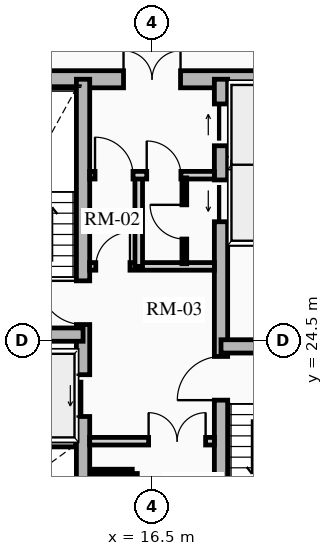
"""IFC4 building model, lengths in metres.
Left out: names, types, materials, properties, quantities, classifications, styles, units other than length and angle.
Written with IfcOpenShell. Run it as: python <this file> out.ifc"""

import sys

from ifc_helpers import new_model, si_unit, direction, frame, frame_2d, origin, place, context, subcontext, project, spatial, rectangle, extrude, source, transform, mapped, element, fill, save


model = new_model("IFC4")
c1 = context("Model", 3, precision=1e-05, world=origin(), true_north=direction((0.0, 1.0)))
c2 = subcontext(c1, "Body", "Model", "MODEL_VIEW")
j1 = project(units=[si_unit("LENGTHUNIT", "METRE"), si_unit("PLANEANGLEUNIT", "RADIAN")], contexts=[c1])
p1 = place(None, origin())
s1 = spatial("IfcSite", under=j1, at=p1, CompositionType="ELEMENT")
p2 = place(p1, origin())
s2 = spatial("IfcBuilding", under=s1, at=p2, CompositionType="ELEMENT")
p3 = place(p2, frame((0.0, 0.0, 119.62)))
s3 = spatial("IfcBuildingStorey", under=s2, at=p3, CompositionType="ELEMENT", Elevation=119.62)
p4 = place(p3, frame((11.15, 31.375, 0.0), z_axis=(0.0, 0.0, 1.0), x_axis=(1.0, 0.0, 0.0)))
e1 = element("IfcWall", 1, at=p4, inside=s3, PredefinedType="SHEAR", context=c2, shape_type="SweptSolid", body=[
    extrude(rectangle(XDim=10.7, YDim=0.45, at=frame_2d((5.35, 0.0))), origin(), (0.0, 0.0, 1.0), 2.91),
])
m1 = source(origin(), c2, "Body", "SweptSolid", [
    extrude(rectangle(XDim=1.5, YDim=2.02, at=frame_2d((0.75, 1.01))), frame((0.0, 0.235, 0.0), z_axis=(0.0, -1.0, 0.0), x_axis=(1.0, 0.0, 0.0)), (0.0, 0.0, 1.0), 0.47),
])
p5 = place(p4, frame((4.6, 0.0, 0.0)))
e2 = element("IfcOpeningElement", 2, at=p5, cuts=e1, PredefinedType="OPENING", context=c2, shape_type="MappedRepresentation", body=[
    mapped(m1, transform((0.0, 0.0, 0.0), x_axis=(1.0, 0.0, 0.0), y_axis=(0.0, 1.0, 0.0), z_axis=(0.0, 0.0, 1.0), scale=1.0)),
])
p6 = place(p3, frame((14.685, 17.625, 0.0), z_axis=(0.0, 0.0, 1.0), x_axis=(0.0, 1.0, 0.0)))
e3 = element("IfcWall", 3, at=p6, inside=s3, PredefinedType="SHEAR", context=c2, shape_type="SweptSolid", body=[
    extrude(rectangle(XDim=13.75, YDim=0.35, at=frame_2d((6.875, 0.0))), origin(), (0.0, 0.0, 1.0), 2.91),
])
m2 = source(origin(), c2, "Body", "SweptSolid", [
    extrude(rectangle(XDim=1.1, YDim=2.015, at=frame_2d((0.55, 1.007))), frame((0.0, 0.185, 0.0), z_axis=(0.0, -1.0, 0.0), x_axis=(1.0, 0.0, 0.0)), (0.0, 0.0, 1.0), 0.37),
])
p7 = place(p6, frame((4.875, 0.0, 0.0)))
e4 = element("IfcOpeningElement", 4, at=p7, cuts=e3, PredefinedType="OPENING", context=c2, shape_type="MappedRepresentation", body=[
    mapped(m2, transform((0.0, 0.0, 0.0), x_axis=(1.0, 0.0, 0.0), y_axis=(0.0, 1.0, 0.0), z_axis=(0.0, 0.0, 1.0), scale=1.0)),
])
m3 = source(origin(), c2, "Body", "SweptSolid", [
    extrude(rectangle(XDim=1.15, YDim=2.02, at=frame_2d((0.575, 1.01))), frame((0.0, 0.185, 0.0), z_axis=(0.0, -1.0, 0.0), x_axis=(1.0, 0.0, 0.0)), (0.0, 0.0, 1.0), 0.37),
])
p8 = place(p6, frame((7.295, 0.0, 0.0)))
e5 = element("IfcOpeningElement", 5, at=p8, cuts=e3, PredefinedType="OPENING", context=c2, shape_type="MappedRepresentation", body=[
    mapped(m3, transform((0.0, 0.0, 0.0), x_axis=(1.0, 0.0, 0.0), y_axis=(0.0, 1.0, 0.0), z_axis=(0.0, 0.0, 1.0), scale=1.0)),
])
p9 = place(p3, frame((18.315, 17.625, 0.0), z_axis=(0.0, 0.0, 1.0), x_axis=(0.0, 1.0, 0.0)))
e6 = element("IfcWall", 6, at=p9, inside=s3, PredefinedType="SHEAR", context=c2, shape_type="SweptSolid", body=[
    extrude(rectangle(XDim=13.75, YDim=0.35, at=frame_2d((6.875, 0.0))), origin(), (0.0, 0.0, 1.0), 2.91),
])
p10 = place(p9, frame((10.0, 0.0, 0.0)))
e7 = element("IfcOpeningElement", 7, at=p10, cuts=e6, PredefinedType="OPENING", context=c2, shape_type="MappedRepresentation", body=[
    mapped(m2, transform((0.0, 0.0, 0.0), x_axis=(1.0, 0.0, 0.0), y_axis=(0.0, 1.0, 0.0), z_axis=(0.0, 0.0, 1.0), scale=1.0)),
])
p11 = place(p9, frame((12.0, 0.0, 0.0)))
e8 = element("IfcOpeningElement", 8, at=p11, cuts=e6, PredefinedType="OPENING", context=c2, shape_type="MappedRepresentation", body=[
    mapped(m2, transform((0.0, 0.0, 0.0), x_axis=(1.0, 0.0, 0.0), y_axis=(0.0, 1.0, 0.0), z_axis=(0.0, 0.0, 1.0), scale=1.0)),
])
p12 = place(p9, frame((5.305, 0.0, 0.0)))
e9 = element("IfcOpeningElement", 9, at=p12, cuts=e6, PredefinedType="OPENING", context=c2, shape_type="MappedRepresentation", body=[
    mapped(m3, transform((0.0, 0.0, 0.0), x_axis=(1.0, 0.0, 0.0), y_axis=(0.0, 1.0, 0.0), z_axis=(0.0, 0.0, 1.0), scale=1.0)),
])
for number, where, z_axis, x_axis in (
    (10, (11.4, 24.655, 0.0), (0.0, 0.0, 1.0), (1.0, 0.0, 0.0)),
    (11, (18.315, 24.345, 0.0), (0.0, 0.0, 1.0), (1.0, 0.0, 0.0)),
):
    element("IfcWall", number, at=place(p3, frame(where, z_axis=z_axis, x_axis=x_axis)), inside=s3, PredefinedType="SHEAR", context=c2, shape_type="SweptSolid", body=[
        extrude(rectangle(XDim=3.285, YDim=0.35, at=frame_2d((1.643, 0.0))), origin(), (0.0, 0.0, 1.0), 2.91),
    ])
for number, where, z_axis, x_axis in (
    (12, (11.52, 21.8, 0.0), (0.0, 0.0, 1.0), (1.0, 0.0, 0.0)),
    (13, (18.51, 27.13, 0.0), (0.0, 0.0, 1.0), (1.0, 0.0, 0.0)),
    (14, (18.51, 29.175, 0.0), (0.0, 0.0, 1.0), (1.0, 0.0, 0.0)),
):
    element("IfcWall", number, at=place(p3, frame(where, z_axis=z_axis, x_axis=x_axis)), inside=s3, PredefinedType="SHEAR", context=c2, shape_type="SweptSolid", body=[
        extrude(rectangle(XDim=2.97, YDim=0.2, at=frame_2d((1.485, 0.0))), origin(), (0.0, 0.0, 1.0), 2.91),
    ])
p13 = place(p3, frame((14.86, 21.85, 0.0), z_axis=(0.0, 0.0, 1.0), x_axis=(1.0, 0.0, 0.0)))
e15 = element("IfcWall", 15, at=p13, inside=s3, PredefinedType="PARTITIONING", context=c2, shape_type="SweptSolid", body=[
    extrude(rectangle(XDim=3.28, YDim=0.2, at=frame_2d((1.64, 0.0))), origin(), (0.0, 0.0, 1.0), 2.655),
])
m4 = source(origin(), c2, "Body", "SweptSolid", [
    extrude(rectangle(XDim=1.5, YDim=2.02, at=frame_2d((0.75, 1.01))), frame((0.0, 0.11, 0.0), z_axis=(0.0, -1.0, 0.0), x_axis=(1.0, 0.0, 0.0)), (0.0, 0.0, 1.0), 0.22),
])
p14 = place(p13, frame((1.55, 0.0, 0.0)))
e16 = element("IfcOpeningElement", 16, at=p14, cuts=e15, PredefinedType="OPENING", context=c2, shape_type="MappedRepresentation", body=[
    mapped(m4, transform((0.0, 0.0, 0.0), x_axis=(1.0, 0.0, 0.0), y_axis=(0.0, 1.0, 0.0), z_axis=(0.0, 0.0, 1.0), scale=1.0)),
])
p15 = place(p3, frame((14.86, 26.45, 0.0), z_axis=(0.0, 0.0, 1.0), x_axis=(1.0, 0.0, 0.0)))
e17 = element("IfcWall", 17, at=p15, inside=s3, PredefinedType="PARTITIONING", context=c2, shape_type="SweptSolid", body=[
    extrude(rectangle(XDim=3.28, YDim=0.2, at=frame_2d((1.64, 0.0))), origin(), (0.0, 0.0, 1.0), 2.655),
])
m5 = source(origin(), c2, "Body", "SweptSolid", [
    extrude(rectangle(XDim=0.9, YDim=2.005, at=frame_2d((0.45, 1.002))), frame((0.0, 0.11, 0.0), z_axis=(0.0, -1.0, 0.0), x_axis=(1.0, 0.0, 0.0)), (0.0, 0.0, 1.0), 0.22),
])
p16 = place(p15, frame((0.16, 0.0, 0.0)))
e18 = element("IfcOpeningElement", 18, at=p16, cuts=e17, PredefinedType="OPENING", context=c2, shape_type="MappedRepresentation", body=[
    mapped(m5, transform((0.0, 0.0, 0.0), x_axis=(1.0, 0.0, 0.0), y_axis=(0.0, 1.0, 0.0), z_axis=(0.0, 0.0, 1.0), scale=1.0)),
])
p17 = place(p3, frame((16.15, 26.45, 0.0), z_axis=(0.0, 0.0, 1.0), x_axis=(0.0, 1.0, 0.0)))
e19 = element("IfcWall", 19, at=p17, inside=s3, PredefinedType="PARTITIONING", context=c2, shape_type="SweptSolid", body=[
    extrude(rectangle(XDim=2.4, YDim=0.2, at=frame_2d((1.2, 0.0))), origin(), (0.0, 0.0, 1.0), 2.655),
])
p18 = place(p3, frame((14.86, 28.85, 0.0), z_axis=(0.0, 0.0, 1.0), x_axis=(1.0, 0.0, 0.0)))
e20 = element("IfcWall", 20, at=p18, inside=s3, PredefinedType="PARTITIONING", context=c2, shape_type="SweptSolid", body=[
    extrude(rectangle(XDim=3.28, YDim=0.2, at=frame_2d((1.64, 0.0))), origin(), (0.0, 0.0, 1.0), 2.655),
])
m6 = source(origin(), c2, "Body", "SweptSolid", [
    extrude(rectangle(XDim=1.0, YDim=2.015, at=frame_2d((0.5, 1.007))), frame((0.0, 0.11, 0.0), z_axis=(0.0, -1.0, 0.0), x_axis=(1.0, 0.0, 0.0)), (0.0, 0.0, 1.0), 0.22),
])
p19 = place(p18, frame((0.14, 0.0, 0.0)))
e21 = element("IfcOpeningElement", 21, at=p19, cuts=e20, PredefinedType="OPENING", context=c2, shape_type="MappedRepresentation", body=[
    mapped(m6, transform((0.0, 0.0, 0.0), x_axis=(1.0, 0.0, 0.0), y_axis=(0.0, 1.0, 0.0), z_axis=(0.0, 0.0, 1.0), scale=1.0)),
])
p20 = place(p18, frame((1.5, 0.0, 0.0)))
e22 = element("IfcOpeningElement", 22, at=p20, cuts=e20, PredefinedType="OPENING", context=c2, shape_type="MappedRepresentation", body=[
    mapped(m5, transform((0.0, 0.0, 0.0), x_axis=(1.0, 0.0, 0.0), y_axis=(0.0, 1.0, 0.0), z_axis=(0.0, 0.0, 1.0), scale=1.0)),
])
p21 = place(p3, frame((16.05, 17.92, 0.0), z_axis=(0.0, 0.0, 1.0), x_axis=(0.0, 1.0, 0.0)))
e23 = element("IfcWall", 23, at=p21, inside=s3, PredefinedType="PARTITIONING", context=c2, shape_type="SweptSolid", body=[
    extrude(rectangle(XDim=3.08, YDim=0.125, at=frame_2d((1.54, 0.0))), origin(), (0.0, 0.0, 1.0), 2.655),
])
m7 = source(origin(), c2, "Body", "SweptSolid", [
    extrude(rectangle(XDim=0.9, YDim=2.005, at=frame_2d((0.45, 1.002))), frame((0.0, 0.073, 0.0), z_axis=(0.0, -1.0, 0.0), x_axis=(1.0, 0.0, 0.0)), (0.0, 0.0, 1.0), 0.145),
])
p22 = place(p21, frame((1.05, 0.0, 0.0)))
e24 = element("IfcOpeningElement", 24, at=p22, cuts=e23, PredefinedType="OPENING", context=c2, shape_type="MappedRepresentation", body=[
    mapped(m7, transform((0.0, 0.0, 0.0), x_axis=(1.0, 0.0, 0.0), y_axis=(0.0, 1.0, 0.0), z_axis=(0.0, 0.0, 1.0), scale=1.0)),
])
p23 = place(p3, frame((14.88, 21.05, 0.0), z_axis=(0.0, 0.0, 1.0), x_axis=(1.0, 0.0, 0.0)))
e25 = element("IfcWall", 25, at=p23, inside=s3, PredefinedType="PARTITIONING", context=c2, shape_type="SweptSolid", body=[
    extrude(rectangle(XDim=1.1, YDim=0.125, at=frame_2d((0.55, 0.0))), origin(), (0.0, 0.0, 1.0), 2.655),
])
p24 = place(p3, frame((17.35, 26.52, 0.0), z_axis=(0.0, 0.0, 1.0), x_axis=(0.0, 1.0, 0.0)))
e26 = element("IfcWall", 26, at=p24, inside=s3, PredefinedType="PARTITIONING", context=c2, shape_type="SweptSolid", body=[
    extrude(rectangle(XDim=2.26, YDim=0.125, at=frame_2d((1.13, 0.0))), origin(), (0.0, 0.0, 1.0), 2.655),
])
p25 = place(p24, frame((0.65, 0.0, 0.0)))
e27 = element("IfcOpeningElement", 27, at=p25, cuts=e26, PredefinedType="OPENING", context=c2, shape_type="MappedRepresentation", body=[
    mapped(m7, transform((0.0, 0.0, 0.0), x_axis=(1.0, 0.0, 0.0), y_axis=(0.0, 1.0, 0.0), z_axis=(0.0, 0.0, 1.0), scale=1.0)),
])
m8 = source(origin(), c2, "Body", "SweptSolid", [
    extrude(rectangle(XDim=1.1, YDim=2.015, at=frame_2d((0.55, 1.007))), frame((0.0, 0.025, 0.0), z_axis=(0.0, -1.0, 0.0), x_axis=(1.0, 0.0, 0.0)), (0.0, 0.0, 1.0), 0.05),
])
p26 = place(p7, origin())
e28 = element("IfcDoor", 28, at=p26, inside=s3, OperationType="SLIDING_TO_LEFT", PredefinedType="DOOR", context=c2, shape_type="MappedRepresentation", body=[
    mapped(m8, transform((0.0, 0.0, 0.0), x_axis=(1.0, 0.0, 0.0), y_axis=(0.0, 1.0, 0.0), z_axis=(0.0, 0.0, 1.0), scale=1.0)),
])
fill(e4, e28)
p27 = place(p10, origin())
e29 = element("IfcDoor", 29, at=p27, inside=s3, OperationType="SLIDING_TO_LEFT", PredefinedType="DOOR", context=c2, shape_type="MappedRepresentation", body=[
    mapped(m8, transform((0.0, 0.0, 0.0), x_axis=(1.0, 0.0, 0.0), y_axis=(0.0, 1.0, 0.0), z_axis=(0.0, 0.0, 1.0), scale=1.0)),
])
fill(e7, e29)
p28 = place(p11, origin())
e30 = element("IfcDoor", 30, at=p28, inside=s3, OperationType="SLIDING_TO_RIGHT", PredefinedType="DOOR", context=c2, shape_type="MappedRepresentation", body=[
    mapped(m8, transform((0.0, 0.0, 0.0), x_axis=(1.0, 0.0, 0.0), y_axis=(0.0, 1.0, 0.0), z_axis=(0.0, 0.0, 1.0), scale=1.0)),
])
fill(e8, e30)
m9 = source(origin(), c2, "Body", "SweptSolid", [
    extrude(rectangle(XDim=1.15, YDim=2.02, at=frame_2d((0.575, 1.01))), frame((0.0, 0.025, 0.0), z_axis=(0.0, -1.0, 0.0), x_axis=(1.0, 0.0, 0.0)), (0.0, 0.0, 1.0), 0.05),
])
p29 = place(p8, origin())
e31 = element("IfcDoor", 31, at=p29, inside=s3, OperationType="SINGLE_SWING_RIGHT", PredefinedType="DOOR", context=c2, shape_type="MappedRepresentation", body=[
    mapped(m9, transform((0.0, 0.0, 0.0), x_axis=(1.0, 0.0, 0.0), y_axis=(0.0, 1.0, 0.0), z_axis=(0.0, 0.0, 1.0), scale=1.0)),
])
fill(e5, e31)
p30 = place(p12, origin())
e32 = element("IfcDoor", 32, at=p30, inside=s3, OperationType="SINGLE_SWING_LEFT", PredefinedType="DOOR", context=c2, shape_type="MappedRepresentation", body=[
    mapped(m9, transform((0.0, 0.0, 0.0), x_axis=(1.0, 0.0, 0.0), y_axis=(0.0, 1.0, 0.0), z_axis=(0.0, 0.0, 1.0), scale=1.0)),
])
fill(e9, e32)
m10 = source(origin(), c2, "Body", "SweptSolid", [
    extrude(rectangle(XDim=1.5, YDim=2.02, at=frame_2d((0.75, 1.01))), frame((0.0, 0.025, 0.0), z_axis=(0.0, -1.0, 0.0), x_axis=(1.0, 0.0, 0.0)), (0.0, 0.0, 1.0), 0.05),
])
p31 = place(p5, origin())
e33 = element("IfcDoor", 33, at=p31, inside=s3, OperationType="DOUBLE_DOOR_SINGLE_SWING", PredefinedType="DOOR", context=c2, shape_type="MappedRepresentation", body=[
    mapped(m10, transform((0.0, 0.0, 0.0), x_axis=(1.0, 0.0, 0.0), y_axis=(0.0, 1.0, 0.0), z_axis=(0.0, 0.0, 1.0), scale=1.0)),
])
fill(e2, e33)
p32 = place(p14, origin())
e34 = element("IfcDoor", 34, at=p32, inside=s3, OperationType="DOUBLE_DOOR_SINGLE_SWING", PredefinedType="DOOR", context=c2, shape_type="MappedRepresentation", body=[
    mapped(m10, transform((0.0, 0.0, 0.0), x_axis=(1.0, 0.0, 0.0), y_axis=(0.0, 1.0, 0.0), z_axis=(0.0, 0.0, 1.0), scale=1.0)),
])
fill(e16, e34)
m11 = source(origin(), c2, "Body", "SweptSolid", [
    extrude(rectangle(XDim=0.9, YDim=2.005, at=frame_2d((0.45, 1.002))), frame((0.0, 0.025, 0.0), z_axis=(0.0, -1.0, 0.0), x_axis=(1.0, 0.0, 0.0)), (0.0, 0.0, 1.0), 0.05),
])
p33 = place(p16, origin())
e35 = element("IfcDoor", 35, at=p33, inside=s3, OperationType="SINGLE_SWING_RIGHT", PredefinedType="DOOR", context=c2, shape_type="MappedRepresentation", body=[
    mapped(m11, transform((0.0, 0.0, 0.0), x_axis=(1.0, 0.0, 0.0), y_axis=(0.0, 1.0, 0.0), z_axis=(0.0, 0.0, 1.0), scale=1.0)),
])
fill(e18, e35)
m12 = source(origin(), c2, "Body", "SweptSolid", [
    extrude(rectangle(XDim=1.0, YDim=2.015, at=frame_2d((0.5, 1.007))), frame((0.0, 0.025, 0.0), z_axis=(0.0, -1.0, 0.0), x_axis=(1.0, 0.0, 0.0)), (0.0, 0.0, 1.0), 0.05),
])
p34 = place(p19, origin())
e36 = element("IfcDoor", 36, at=p34, inside=s3, OperationType="SINGLE_SWING_LEFT", PredefinedType="DOOR", context=c2, shape_type="MappedRepresentation", body=[
    mapped(m12, transform((0.0, 0.0, 0.0), x_axis=(1.0, 0.0, 0.0), y_axis=(0.0, 1.0, 0.0), z_axis=(0.0, 0.0, 1.0), scale=1.0)),
])
fill(e21, e36)
p35 = place(p20, origin())
e37 = element("IfcDoor", 37, at=p35, inside=s3, OperationType="SINGLE_SWING_LEFT", PredefinedType="DOOR", context=c2, shape_type="MappedRepresentation", body=[
    mapped(m11, transform((0.0, 0.0, 0.0), x_axis=(1.0, 0.0, 0.0), y_axis=(0.0, 1.0, 0.0), z_axis=(0.0, 0.0, 1.0), scale=1.0)),
])
fill(e22, e37)
p36 = place(p25, origin())
e38 = element("IfcDoor", 38, at=p36, inside=s3, OperationType="SINGLE_SWING_RIGHT", PredefinedType="DOOR", context=c2, shape_type="MappedRepresentation", body=[
    mapped(m11, transform((0.0, 0.0, 0.0), x_axis=(1.0, 0.0, 0.0), y_axis=(0.0, 1.0, 0.0), z_axis=(0.0, 0.0, 1.0), scale=1.0)),
])
fill(e27, e38)
save(model, sys.argv[1])
